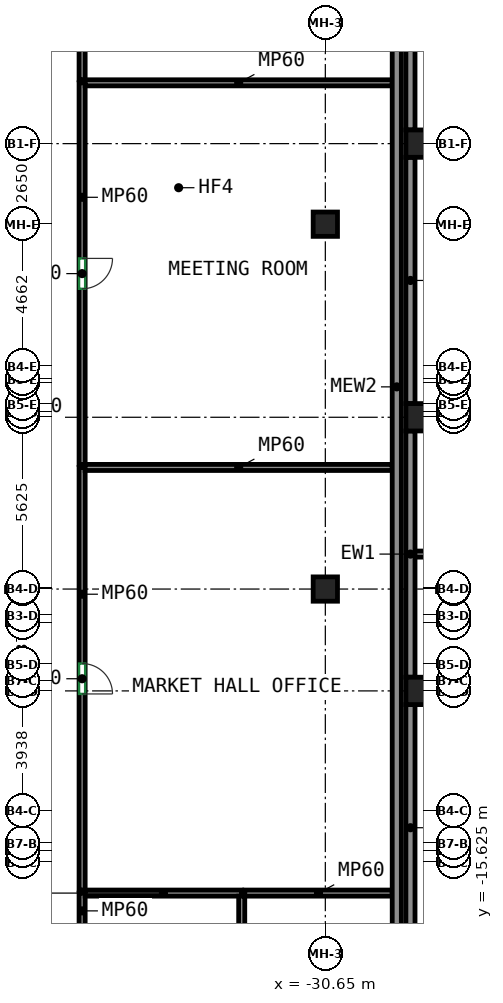
"""IFC4 building model, lengths in metres.
Left out: names, types, materials, properties, quantities, classifications, styles, units other than length and angle.
Written with IfcOpenShell. Run it as: python <this file> out.ifc"""

import sys

from ifc_helpers import new_model, si_unit, direction, frame, frame_2d, origin, origin_2d, place, context, subcontext, project, spatial, rectangle, extrude, source, transform, mapped, element, fill, save


model = new_model("IFC4")
c1 = context("Model", 3, precision=1e-05, world=origin(), true_north=direction((0.0, 1.0)))
c2 = subcontext(c1, "Body", "Model", "MODEL_VIEW")
j1 = project(units=[si_unit("LENGTHUNIT", "METRE"), si_unit("PLANEANGLEUNIT", "RADIAN")], contexts=[c1])
p1 = place(None, origin())
s1 = spatial("IfcSite", under=j1, at=p1, CompositionType="ELEMENT")
p2 = place(p1, origin())
s2 = spatial("IfcBuilding", under=s1, at=p2, CompositionType="ELEMENT")
p3 = place(p2, frame((0.0, 0.0, 13.5)))
s3 = spatial("IfcBuildingStorey", under=s2, at=p3, CompositionType="ELEMENT", Elevation=13.5)
m1 = source(origin(), c2, "Body", "SweptSolid", [
    extrude(rectangle(XDim=0.9, YDim=0.9, at=origin_2d()), origin(), (0.0, 0.0, 1.0), 4.1),
])
for number, where, z_axis, x_axis in (
    (1, (-27.55, -10.0, 0.0), (0.0, 0.0, 1.0), (1.0, 0.0, 0.0)),
    (2, (-27.55, -1.0, 0.0), (0.0, 0.0, 1.0), (1.0, 0.0, 0.0)),
    (3, (-27.55, 8.0, 0.0), (0.0, 0.0, 1.0), (1.0, 0.0, 0.0)),
):
    element("IfcColumn", number, at=place(p3, frame(where, z_axis=z_axis, x_axis=x_axis)), inside=s3, PredefinedType="COLUMN", context=c2, shape_type="MappedRepresentation", body=[
        mapped(m1, transform((0.0, 0.0, 0.0))),
    ])
m2 = source(origin(), c2, "Body", "SweptSolid", [
    extrude(rectangle(XDim=0.8, YDim=0.8, at=origin_2d()), origin(), (0.0, 0.0, 1.0), 4.1),
])
for number, where, z_axis, x_axis in (
    (4, (-30.65, -6.65, 0.0), (0.0, 0.0, 1.0), (1.0, 0.0, 0.0)),
    (5, (-30.65, 5.35, 0.0), (0.0, 0.0, 1.0), (1.0, 0.0, 0.0)),
):
    element("IfcColumn", number, at=place(p3, frame(where, z_axis=z_axis, x_axis=x_axis)), inside=s3, PredefinedType="COLUMN", context=c2, shape_type="MappedRepresentation", body=[
        mapped(m2, transform((0.0, 0.0, 0.0))),
    ])
m3 = source(origin(), c2, "Body", "SweptSolid", [
    extrude(rectangle(XDim=15.282, YDim=0.3, at=frame_2d((7.641, 0.0))), origin(), (0.0, 0.0, 1.0), 4.1),
])
p4 = place(p3, frame((-27.85, 23.732, 0.0), z_axis=(0.0, 0.0, 1.0), x_axis=(0.0, -1.0, 0.0)))
e6 = element("IfcWall", 6, at=p4, inside=s3, PredefinedType="SOLIDWALL", context=c2, shape_type="MappedRepresentation", body=[
    mapped(m3, transform((0.0, 0.0, 0.0))),
])
m4 = source(origin(), c2, "Body", "SweptSolid", [
    extrude(rectangle(XDim=8.1, YDim=0.3, at=frame_2d((4.05, 0.0))), origin(), (0.0, 0.0, 1.0), 4.1),
])
for number, where, z_axis, x_axis in (
    (7, (-27.85, 7.55, 0.0), (0.0, 0.0, 1.0), (0.0, -1.0, 0.0)),
    (8, (-27.85, -1.45, 0.0), (0.0, 0.0, 1.0), (0.0, -1.0, 0.0)),
    (9, (-27.85, -10.45, 0.0), (0.0, 0.0, 1.0), (0.0, -1.0, 0.0)),
):
    element("IfcWall", number, at=place(p3, frame(where, z_axis=z_axis, x_axis=x_axis)), inside=s3, PredefinedType="SOLIDWALL", context=c2, shape_type="MappedRepresentation", body=[
        mapped(m4, transform((0.0, 0.0, 0.0))),
    ])
m5 = source(origin(), c2, "Body", "SweptSolid", [
    extrude(rectangle(XDim=56.3, YDim=0.3, at=frame_2d((28.15, 0.0))), origin(), (0.0, 0.0, 1.0), 4.1),
])
p5 = place(p3, frame((-28.3, 28.15, 0.0), z_axis=(0.0, 0.0, 1.0), x_axis=(0.0, -1.0, 0.0)))
e10 = element("IfcWall", 10, at=p5, inside=s3, PredefinedType="SOLIDWALL", context=c2, shape_type="MappedRepresentation", body=[
    mapped(m5, transform((0.0, 0.0, 0.0))),
])
p6 = place(p3, frame((-27.75, -5.5, 0.0), z_axis=(0.0, 0.0, 1.0), x_axis=(1.0, 0.0, 0.0)))
e11 = element("IfcWall", 11, at=p6, inside=s3, PredefinedType="PARTITIONING", context=c2, shape_type="SweptSolid", body=[
    extrude(rectangle(XDim=17.324, YDim=0.2, at=frame_2d((8.662, 0.0))), origin(), (0.0, 0.0, 1.0), 4.1),
])
m6 = source(origin(), c2, "Body", "SweptSolid", [
    extrude(rectangle(XDim=3.9, YDim=0.2, at=frame_2d((1.95, 0.0))), origin(), (0.0, 0.0, 1.0), 3.3),
])
p7 = place(p3, frame((-38.65, -16.65, 0.0), z_axis=(0.0, 0.0, 1.0), x_axis=(0.0, -1.0, 0.0)))
e12 = element("IfcWall", 12, at=p7, inside=s3, PredefinedType="PARTITIONING", context=c2, shape_type="MappedRepresentation", body=[
    mapped(m6, transform((0.0, 0.0, 0.0))),
])
p8 = place(p7, frame((1.4, 0.0, 0.0)))
e13 = element("IfcOpeningElement", 13, at=p8, cuts=e12, PredefinedType="OPENING", context=c2, shape_type="SweptSolid", body=[
    extrude(rectangle(XDim=1.1, YDim=2.1, at=frame_2d((0.55, 1.05))), frame((0.0, 0.11, 0.0), z_axis=(0.0, -1.0, 0.0), x_axis=(1.0, 0.0, 0.0)), (0.0, 0.0, 1.0), 0.22),
])
m7 = source(origin(), c2, "Body", "SweptSolid", [
    extrude(rectangle(XDim=5.15, YDim=0.2, at=frame_2d((2.575, 0.0))), origin(), (0.0, 0.0, 1.0), 3.5),
])
p9 = place(p3, frame((-38.55, -16.65, 0.0), z_axis=(0.0, 0.0, 1.0), x_axis=(1.0, 0.0, 0.0)))
e14 = element("IfcWall", 14, at=p9, inside=s3, PredefinedType="PARTITIONING", context=c2, shape_type="MappedRepresentation", body=[
    mapped(m7, transform((0.0, 0.0, 0.0))),
])
m8 = source(origin(), c2, "Body", "SweptSolid", [
    extrude(rectangle(XDim=13.9, YDim=0.2, at=frame_2d((6.95, 0.0))), origin(), (0.0, 0.0, 1.0), 3.3),
])
p10 = place(p3, frame((-38.65, -2.65, 0.0), z_axis=(0.0, 0.0, 1.0), x_axis=(0.0, -1.0, 0.0)))
e15 = element("IfcWall", 15, at=p10, inside=s3, PredefinedType="PARTITIONING", context=c2, shape_type="MappedRepresentation", body=[
    mapped(m8, transform((0.0, 0.0, 0.0))),
])
p11 = place(p10, frame((6.45, 0.0, 0.0)))
e16 = element("IfcOpeningElement", 16, at=p11, cuts=e15, PredefinedType="OPENING", context=c2, shape_type="SweptSolid", body=[
    extrude(rectangle(XDim=1.0, YDim=2.1, at=frame_2d((0.5, 1.05))), frame((0.0, 0.11, 0.0), z_axis=(0.0, -1.0, 0.0), x_axis=(1.0, 0.0, 0.0)), (0.0, 0.0, 1.0), 0.22),
])
m9 = source(origin(), c2, "Body", "SweptSolid", [
    extrude(rectangle(XDim=10.1, YDim=0.2, at=frame_2d((5.05, 0.0))), origin(), (0.0, 0.0, 1.0), 3.3),
])
p12 = place(p3, frame((-38.55, -2.65, 0.0), z_axis=(0.0, 0.0, 1.0), x_axis=(1.0, 0.0, 0.0)))
e17 = element("IfcWall", 17, at=p12, inside=s3, PredefinedType="PARTITIONING", context=c2, shape_type="MappedRepresentation", body=[
    mapped(m9, transform((0.0, 0.0, 0.0))),
])
m10 = source(origin(), c2, "Body", "SweptSolid", [
    extrude(rectangle(XDim=12.55, YDim=0.2, at=frame_2d((6.275, 0.0))), origin(), (0.0, 0.0, 1.0), 3.3),
])
p13 = place(p3, frame((-38.65, 10.0, 0.0), z_axis=(0.0, 0.0, 1.0), x_axis=(0.0, -1.0, 0.0)))
e18 = element("IfcWall", 18, at=p13, inside=s3, PredefinedType="PARTITIONING", context=c2, shape_type="MappedRepresentation", body=[
    mapped(m10, transform((0.0, 0.0, 0.0))),
])
p14 = place(p13, frame((5.775, 0.0, 0.0)))
e19 = element("IfcOpeningElement", 19, at=p14, cuts=e18, PredefinedType="OPENING", context=c2, shape_type="SweptSolid", body=[
    extrude(rectangle(XDim=1.0, YDim=2.1, at=frame_2d((0.5, 1.05))), frame((0.0, 0.11, 0.0), z_axis=(0.0, -1.0, 0.0), x_axis=(1.0, 0.0, 0.0)), (0.0, 0.0, 1.0), 0.22),
])
p15 = place(p3, frame((-38.55, 10.0, 0.0), z_axis=(0.0, 0.0, 1.0), x_axis=(1.0, 0.0, 0.0)))
e20 = element("IfcWall", 20, at=p15, inside=s3, PredefinedType="PARTITIONING", context=c2, shape_type="MappedRepresentation", body=[
    mapped(m9, transform((0.0, 0.0, 0.0))),
])
m11 = source(origin(), c2, "Body", "SweptSolid", [
    extrude(rectangle(XDim=18.05, YDim=0.2, at=frame_2d((9.025, 0.0))), origin(), (0.0, 0.0, 1.0), 3.3),
])
p16 = place(p3, frame((-38.65, 28.15, 0.0), z_axis=(0.0, 0.0, 1.0), x_axis=(0.0, -1.0, 0.0)))
e21 = element("IfcWall", 21, at=p16, inside=s3, PredefinedType="PARTITIONING", context=c2, shape_type="MappedRepresentation", body=[
    mapped(m11, transform((0.0, 0.0, 0.0))),
])
p17 = place(p16, frame((7.825, 0.0, 0.0)))
e22 = element("IfcOpeningElement", 22, at=p17, cuts=e21, PredefinedType="OPENING", context=c2, shape_type="SweptSolid", body=[
    extrude(rectangle(XDim=2.4, YDim=2.4, at=frame_2d((1.2, 1.2))), frame((0.0, 0.11, 0.0), z_axis=(0.0, -1.0, 0.0), x_axis=(1.0, 0.0, 0.0)), (0.0, 0.0, 1.0), 0.22),
])
m12 = source(origin(), c2, "Body", "SweptSolid", [
    extrude(rectangle(XDim=3.8, YDim=0.2, at=frame_2d((1.9, 0.0))), origin(), (0.0, 0.0, 1.0), 3.3),
])
p18 = place(p3, frame((-33.4, -20.55, 0.0), z_axis=(0.0, 0.0, 1.0), x_axis=(0.0, 1.0, 0.0)))
e23 = element("IfcWall", 23, at=p18, inside=s3, PredefinedType="PARTITIONING", context=c2, shape_type="MappedRepresentation", body=[
    mapped(m12, transform((0.0, 0.0, 0.0))),
])
m13 = source(origin(), c2, "Body", "SweptSolid", [
    extrude(rectangle(XDim=4.85, YDim=0.2, at=frame_2d((2.425, 0.0))), origin(), (0.0, 0.0, 1.0), 3.3),
])
p19 = place(p3, frame((-33.3, -16.65, 0.0), z_axis=(0.0, 0.0, 1.0), x_axis=(1.0, 0.0, 0.0)))
e24 = element("IfcWall", 24, at=p19, inside=s3, PredefinedType="PARTITIONING", context=c2, shape_type="MappedRepresentation", body=[
    mapped(m13, transform((0.0, 0.0, 0.0))),
])
p20 = place(p11, origin())
e25 = element("IfcDoor", 25, at=p20, inside=s3, OperationType="SINGLE_SWING_RIGHT", PredefinedType="DOOR", context=c2, shape_type="SweptSolid", body=[
    extrude(rectangle(XDim=1.0, YDim=2.1, at=frame_2d((0.5, 1.05))), frame((0.0, 0.025, 0.0), z_axis=(0.0, -1.0, 0.0), x_axis=(1.0, 0.0, 0.0)), (0.0, 0.0, 1.0), 0.05),
])
fill(e16, e25)
p21 = place(p14, origin())
e26 = element("IfcDoor", 26, at=p21, inside=s3, OperationType="SINGLE_SWING_LEFT", PredefinedType="DOOR", context=c2, shape_type="SweptSolid", body=[
    extrude(rectangle(XDim=1.0, YDim=2.1, at=frame_2d((0.5, 1.05))), frame((0.0, 0.025, 0.0), z_axis=(0.0, -1.0, 0.0), x_axis=(1.0, 0.0, 0.0)), (0.0, 0.0, 1.0), 0.05),
])
fill(e19, e26)
save(model, sys.argv[1])
